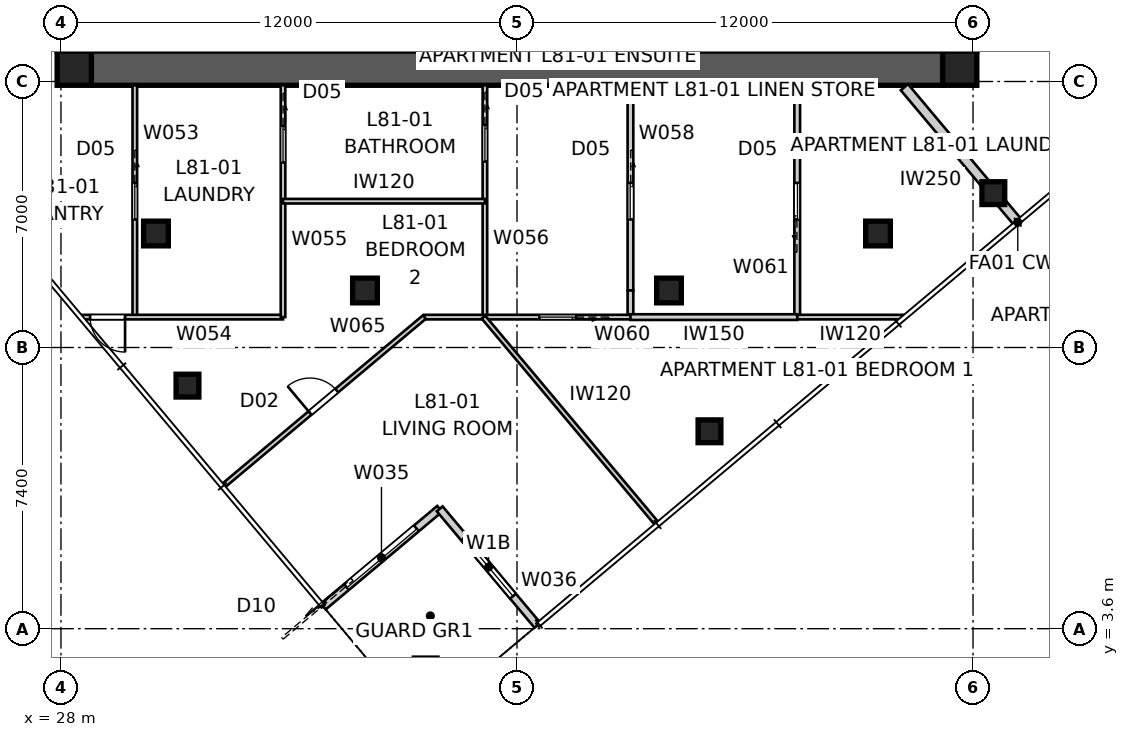
"""IFC4 building model, lengths in metres.
Left out: names, types, materials, properties, quantities, classifications, styles, units other than length and angle.
Written with IfcOpenShell. Run it as: python <this file> out.ifc"""

import sys

from ifc_helpers import new_model, si_unit, direction, frame, frame_2d, origin, origin_2d, place, context, subcontext, project, spatial, polyline, rectangle, outline, extrude, element, fill, save


model = new_model("IFC4")
c1 = context("Model", 3, precision=1e-05, world=origin(), true_north=direction((0.0, 1.0)))
c2 = subcontext(c1, "Body", "Model", "MODEL_VIEW")
j1 = project(units=[si_unit("LENGTHUNIT", "METRE"), si_unit("PLANEANGLEUNIT", "RADIAN")], contexts=[c1])
p1 = place(None, origin())
s1 = spatial("IfcSite", under=j1, at=p1, CompositionType="ELEMENT")
p2 = place(p1, origin())
s2 = spatial("IfcBuilding", under=s1, at=p2, CompositionType="ELEMENT")
p3 = place(p2, frame((0.0, 0.0, 293.0)))
s3 = spatial("IfcBuildingStorey", under=s2, at=p3, CompositionType="ELEMENT", Elevation=293.0)
p4 = place(p3, frame((51.2, 18.35, 0.0), z_axis=(0.0, 0.0, 1.0), x_axis=(-1.0, 0.0, 0.0)))
e1 = element("IfcWall", 1, at=p4, inside=s3, PredefinedType="SHEAR", context=c2, shape_type="SweptSolid", body=[
    extrude(outline(polyline([(0.0, -0.45), (22.4, -0.45), (22.4, -0.025), (22.85, -0.025), (22.85, 0.025), (22.4, 0.025), (22.4, 0.45), (0.0, 0.45), (0.0, 0.025), (-0.45, 0.025), (-0.45, -0.025), (0.0, -0.025), (0.0, -0.45)])), origin(), (0.0, 0.0, 1.0), 3.4),
])
p5 = place(p3, frame((51.65, 18.8, 0.0), z_axis=(0.0, 0.0, 1.0), x_axis=(0.0, 1.0, 0.0)))
e2 = element("IfcWall", 2, at=p5, inside=s3, PredefinedType="SHEAR", context=c2, shape_type="SweptSolid", body=[
    extrude(outline(polyline([(0.0, -0.45), (22.4, -0.45), (22.4, -0.025), (22.85, -0.025), (22.85, 0.025), (22.4, 0.025), (22.4, 0.45), (0.0, 0.45), (0.0, 0.025), (-0.45, 0.025), (-0.45, -0.025), (0.0, -0.025), (0.0, -0.45)])), origin(), (0.0, 0.0, 1.0), 3.4),
])
p6 = place(p5, frame((11.14, 0.0, 0.0)))
e3 = element("IfcOpeningElement", 3, at=p6, cuts=e2, PredefinedType="OPENING", context=c2, shape_type="SweptSolid", body=[
    extrude(rectangle(XDim=1.02, YDim=2.4, at=frame_2d((0.51, 1.2))), frame((0.0, 0.46, 0.0), z_axis=(0.0, -1.0, 0.0), x_axis=(1.0, 0.0, 0.0)), (0.0, 0.0, 1.0), 0.92),
])
p7 = place(p3, frame((28.35, 41.2, 0.0), z_axis=(0.0, 0.0, 1.0), x_axis=(0.0, -1.0, 0.0)))
e4 = element("IfcWall", 4, at=p7, inside=s3, PredefinedType="SHEAR", context=c2, shape_type="SweptSolid", body=[
    extrude(outline(polyline([(0.0, -0.45), (22.4, -0.45), (22.4, -0.025), (22.85, -0.025), (22.85, 0.025), (22.4, 0.025), (22.4, 0.45), (0.0, 0.45), (0.0, 0.025), (-0.45, 0.025), (-0.45, -0.025), (0.0, -0.025), (0.0, -0.45)])), origin(), (0.0, 0.0, 1.0), 3.4),
])
p8 = place(p7, frame((11.14, 0.0, 0.0)))
e5 = element("IfcOpeningElement", 5, at=p8, cuts=e4, PredefinedType="OPENING", context=c2, shape_type="SweptSolid", body=[
    extrude(rectangle(XDim=1.02, YDim=2.4, at=frame_2d((0.51, 1.2))), frame((0.0, 0.46, 0.0), z_axis=(0.0, -1.0, 0.0), x_axis=(1.0, 0.0, 0.0)), (0.0, 0.0, 1.0), 0.92),
])
for number, where, z_axis, x_axis in (
    (6, (28.35, 18.35, 0.0), (0.0, 0.0, 1.0), (1.0, 0.0, 0.0)),
    (7, (51.65, 18.35, 0.0), (0.0, 0.0, 1.0), (1.0, 0.0, 0.0)),
):
    element("IfcColumn", number, at=place(p3, frame(where, z_axis=z_axis, x_axis=x_axis)), inside=s3, PredefinedType="COLUMN", context=c2, shape_type="SweptSolid", body=[
        extrude(rectangle(XDim=0.9, YDim=0.9, at=origin_2d()), origin(), (0.0, 0.0, 1.0), 3.4),
    ])
for number, where, z_axis, x_axis in (
    (8, (45.065, 8.795, 0.0), (0.0, 0.0, 1.0), (1.0, 0.0, 0.0)),
    (9, (52.534, 15.062, 0.0), (0.0, 0.0, 1.0), (1.0, 0.0, 0.0)),
    (10, (31.329, 9.997, 0.0), (0.0, 0.0, 1.0), (1.0, 0.0, 0.0)),
):
    element("IfcColumn", number, at=place(p3, frame(where, z_axis=z_axis, x_axis=x_axis)), inside=s3, PredefinedType="COLUMN", context=c2, shape_type="SweptSolid", body=[
        extrude(rectangle(XDim=0.6, YDim=0.6, at=origin_2d()), origin(), (0.0, 0.0, 1.0), 3.4),
    ])
for number, where, z_axis, x_axis in (
    (11, (30.5, 14.0, 0.0), (0.0, 0.0, 1.0), (1.0, 0.0, 0.0)),
    (12, (36.0, 12.5, 0.0), (0.0, 0.0, 1.0), (1.0, 0.0, 0.0)),
    (13, (44.0, 12.5, 0.0), (0.0, 0.0, 1.0), (1.0, 0.0, 0.0)),
    (14, (49.5, 14.0, 0.0), (0.0, 0.0, 1.0), (1.0, 0.0, 0.0)),
):
    element("IfcColumn", number, at=place(p3, frame(where, z_axis=z_axis, x_axis=x_axis)), inside=s3, PredefinedType="COLUMN", context=c2, shape_type="SweptSolid", body=[
        extrude(rectangle(XDim=0.65, YDim=0.65, at=origin_2d()), origin(), (0.0, 0.0, 1.0), 3.4),
    ])
p9 = place(p3, frame((34.902, 4.183, 0.0), z_axis=(0.0, 0.0, 1.0), x_axis=(0.766060656284, 0.642768287094, 0.0)))
e15 = element("IfcWall", 15, at=p9, inside=s3, PredefinedType="SOLIDWALL", context=c2, shape_type="SweptSolid", body=[
    extrude(rectangle(XDim=4.0, YDim=0.2, at=frame_2d((2.0, 0.0))), origin(), (0.0, 0.0, 1.0), 3.25),
])
p10 = place(p9, frame((0.8, 0.0, 0.0)))
e16 = element("IfcOpeningElement", 16, at=p10, cuts=e15, PredefinedType="OPENING", context=c2, shape_type="SweptSolid", body=[
    extrude(rectangle(XDim=2.4, YDim=2.4, at=frame_2d((1.2, 1.2))), frame((0.0, 0.11, 0.0), z_axis=(0.0, -1.0, 0.0), x_axis=(1.0, 0.0, 0.0)), (0.0, 0.0, 1.0), 0.22),
])
p11 = place(p3, frame((37.966, 6.754, 0.0), z_axis=(0.0, 0.0, 1.0), x_axis=(0.642798342015, -0.766035437498, 0.0)))
e17 = element("IfcWall", 17, at=p11, inside=s3, PredefinedType="SOLIDWALL", context=c2, shape_type="SweptSolid", body=[
    extrude(rectangle(XDim=4.0, YDim=0.2, at=frame_2d((2.0, 0.0))), origin(), (0.0, 0.0, 1.0), 3.25),
])
p12 = place(p11, frame((1.0, 0.0, 0.45)))
e18 = element("IfcOpeningElement", 18, at=p12, cuts=e17, PredefinedType="OPENING", context=c2, shape_type="SweptSolid", body=[
    extrude(rectangle(XDim=2.0, YDim=1.8, at=frame_2d((1.0, 0.9))), frame((0.0, 0.11, 0.0), z_axis=(0.0, -1.0, 0.0), x_axis=(1.0, 0.0, 0.0)), (0.0, 0.0, 1.0), 0.22),
])
p13 = place(p3, frame((53.177, 14.296, 0.0), z_axis=(0.0, 0.0, 1.0), x_axis=(-0.64279957712, 0.76603440109, 0.0)))
e19 = element("IfcWall", 19, at=p13, inside=s3, PredefinedType="PARTITIONING", context=c2, shape_type="SweptSolid", body=[
    extrude(rectangle(XDim=4.64, YDim=0.25, at=frame_2d((2.32, 0.0))), origin(), (0.0, 0.0, 1.0), 3.25),
])
p14 = place(p3, frame((27.9, 19.172, 0.0), z_axis=(0.0, 0.0, 1.0), x_axis=(-0.766017381482, -0.642819859111, 0.0)))
e20 = element("IfcWall", 20, at=p14, inside=s3, PredefinedType="PARTITIONING", context=c2, shape_type="SweptSolid", body=[
    extrude(rectangle(XDim=4.231, YDim=0.12, at=frame_2d((2.115, 0.0))), origin(), (0.0, 0.0, 1.0), 3.25),
])
p15 = place(p14, frame((1.676, 0.0, 0.0)))
e21 = element("IfcOpeningElement", 21, at=p15, cuts=e20, PredefinedType="OPENING", context=c2, shape_type="SweptSolid", body=[
    extrude(rectangle(XDim=0.92, YDim=2.1, at=frame_2d((0.46, 1.05))), frame((0.0, 0.07, 0.0), z_axis=(0.0, -1.0, 0.0), x_axis=(1.0, 0.0, 0.0)), (0.0, 0.0, 1.0), 0.14),
])
p16 = place(p3, frame((29.944, 17.9, 0.0), z_axis=(0.0, 0.0, 1.0), x_axis=(0.0, -1.0, 0.0)))
e22 = element("IfcWall", 22, at=p16, inside=s3, PredefinedType="PARTITIONING", context=c2, shape_type="SweptSolid", body=[
    extrude(rectangle(XDim=6.1, YDim=0.12, at=frame_2d((3.05, 0.0))), origin(), (0.0, 0.0, 1.0), 3.25),
])
p17 = place(p16, frame((2.57, 0.0, 0.0)))
e23 = element("IfcOpeningElement", 23, at=p17, cuts=e22, PredefinedType="OPENING", context=c2, shape_type="SweptSolid", body=[
    extrude(rectangle(XDim=0.96, YDim=2.1, at=frame_2d((0.48, 1.05))), frame((0.0, 0.07, 0.0), z_axis=(0.0, -1.0, 0.0), x_axis=(1.0, 0.0, 0.0)), (0.0, 0.0, 1.0), 0.14),
])
p18 = place(p3, frame((33.844, 11.8, 0.0), z_axis=(0.0, 0.0, 1.0), x_axis=(-1.0, 0.0, 0.0)))
e24 = element("IfcWall", 24, at=p18, inside=s3, PredefinedType="PARTITIONING", context=c2, shape_type="SweptSolid", body=[
    extrude(rectangle(XDim=5.281, YDim=0.12, at=frame_2d((2.64, 0.0))), origin(), (0.0, 0.0, 1.0), 3.25),
])
p19 = place(p18, frame((4.156, 0.0, 0.0)))
e25 = element("IfcOpeningElement", 25, at=p19, cuts=e24, PredefinedType="OPENING", context=c2, shape_type="SweptSolid", body=[
    extrude(rectangle(XDim=0.92, YDim=2.34, at=frame_2d((0.46, 1.17))), frame((0.0, 0.07, 0.0), z_axis=(0.0, -1.0, 0.0), x_axis=(1.0, 0.0, 0.0)), (0.0, 0.0, 1.0), 0.14),
])
p20 = place(p3, frame((33.844, 17.9, 0.0), z_axis=(0.0, 0.0, 1.0), x_axis=(0.0, -1.0, 0.0)))
e26 = element("IfcWall", 26, at=p20, inside=s3, PredefinedType="PARTITIONING", context=c2, shape_type="SweptSolid", body=[
    extrude(rectangle(XDim=6.1, YDim=0.12, at=frame_2d((3.05, 0.0))), origin(), (0.0, 0.0, 1.0), 3.25),
])
p21 = place(p20, frame((1.07, 0.0, 0.0)))
e27 = element("IfcOpeningElement", 27, at=p21, cuts=e26, PredefinedType="OPENING", context=c2, shape_type="SweptSolid", body=[
    extrude(rectangle(XDim=0.96, YDim=2.1, at=frame_2d((0.48, 1.05))), frame((0.0, 0.07, 0.0), z_axis=(0.0, -1.0, 0.0), x_axis=(1.0, 0.0, 0.0)), (0.0, 0.0, 1.0), 0.14),
])
p22 = place(p3, frame((39.156, 17.9, 0.0), z_axis=(0.0, 0.0, 1.0), x_axis=(0.0, -1.0, 0.0)))
e28 = element("IfcWall", 28, at=p22, inside=s3, PredefinedType="PARTITIONING", context=c2, shape_type="SweptSolid", body=[
    extrude(rectangle(XDim=6.1, YDim=0.12, at=frame_2d((3.05, 0.0))), origin(), (0.0, 0.0, 1.0), 3.25),
])
p23 = place(p22, frame((1.045, 0.0, 0.0)))
e29 = element("IfcOpeningElement", 29, at=p23, cuts=e28, PredefinedType="OPENING", context=c2, shape_type="SweptSolid", body=[
    extrude(rectangle(XDim=0.96, YDim=2.1, at=frame_2d((0.48, 1.05))), frame((0.0, 0.07, 0.0), z_axis=(0.0, -1.0, 0.0), x_axis=(1.0, 0.0, 0.0)), (0.0, 0.0, 1.0), 0.14),
])
p24 = place(p3, frame((39.156, 14.85, 0.0), z_axis=(0.0, 0.0, 1.0), x_axis=(-1.0, 0.0, 0.0)))
e30 = element("IfcWall", 30, at=p24, inside=s3, PredefinedType="PARTITIONING", context=c2, shape_type="SweptSolid", body=[
    extrude(rectangle(XDim=5.312, YDim=0.12, at=frame_2d((2.656, 0.0))), origin(), (0.0, 0.0, 1.0), 3.25),
])
p25 = place(p3, frame((42.986, 17.9, 0.0), z_axis=(0.0, 0.0, 1.0), x_axis=(0.0, -1.0, 0.0)))
e31 = element("IfcWall", 31, at=p25, inside=s3, PredefinedType="SOLIDWALL", context=c2, shape_type="SweptSolid", body=[
    extrude(rectangle(XDim=5.4, YDim=0.15, at=frame_2d((2.7, 0.0))), origin(), (0.0, 0.0, 1.0), 2.796),
])
p26 = place(p25, frame((2.57, 0.0, 0.0)))
e32 = element("IfcOpeningElement", 32, at=p26, cuts=e31, PredefinedType="OPENING", context=c2, shape_type="SweptSolid", body=[
    extrude(rectangle(XDim=0.96, YDim=2.1, at=frame_2d((0.48, 1.05))), frame((0.0, 0.085, 0.0), z_axis=(0.0, -1.0, 0.0), x_axis=(1.0, 0.0, 0.0)), (0.0, 0.0, 1.0), 0.17),
])
p27 = place(p3, frame((42.986, 12.5, 0.0), z_axis=(0.0, 0.0, 1.0), x_axis=(0.0, -1.0, 0.0)))
e33 = element("IfcWall", 33, at=p27, inside=s3, PredefinedType="SOLIDWALL", context=c2, shape_type="SweptSolid", body=[
    extrude(rectangle(XDim=0.7, YDim=0.15, at=frame_2d((0.35, 0.0))), origin(), (0.0, 0.0, 1.0), 3.25),
])
p28 = place(p3, frame((42.986, 11.8, 0.0), z_axis=(0.0, 0.0, 1.0), x_axis=(-1.0, 0.0, 0.0)))
e34 = element("IfcWall", 34, at=p28, inside=s3, PredefinedType="PARTITIONING", context=c2, shape_type="SweptSolid", body=[
    extrude(rectangle(XDim=5.423, YDim=0.12, at=frame_2d((2.712, 0.0))), origin(), (0.0, 0.0, 1.0), 3.25),
])
p29 = place(p28, frame((1.435, 0.0, 0.0)))
e35 = element("IfcOpeningElement", 35, at=p29, cuts=e34, PredefinedType="OPENING", context=c2, shape_type="SweptSolid", body=[
    extrude(rectangle(XDim=0.96, YDim=2.1, at=frame_2d((0.48, 1.05))), frame((0.0, 0.07, 0.0), z_axis=(0.0, -1.0, 0.0), x_axis=(1.0, 0.0, 0.0)), (0.0, 0.0, 1.0), 0.14),
])
p30 = place(p3, frame((47.374, 11.8, 0.0), z_axis=(0.0, 0.0, 1.0), x_axis=(0.0, 1.0, 0.0)))
e36 = element("IfcWall", 36, at=p30, inside=s3, PredefinedType="SOLIDWALL", context=c2, shape_type="SweptSolid", body=[
    extrude(rectangle(XDim=6.1, YDim=0.15, at=frame_2d((3.05, 0.0))), origin(), (0.0, 0.0, 1.0), 3.25),
])
p31 = place(p30, frame((2.57, 0.0, 0.0)))
e37 = element("IfcOpeningElement", 37, at=p31, cuts=e36, PredefinedType="OPENING", context=c2, shape_type="SweptSolid", body=[
    extrude(rectangle(XDim=0.96, YDim=2.1, at=frame_2d((0.48, 1.05))), frame((0.0, 0.085, 0.0), z_axis=(0.0, -1.0, 0.0), x_axis=(1.0, 0.0, 0.0)), (0.0, 0.0, 1.0), 0.17),
])
p32 = place(p3, frame((50.162, 11.8, 0.0), z_axis=(0.0, 0.0, 1.0), x_axis=(-1.0, 0.0, 0.0)))
e38 = element("IfcWall", 38, at=p32, inside=s3, PredefinedType="PARTITIONING", context=c2, shape_type="SweptSolid", body=[
    extrude(rectangle(XDim=2.789, YDim=0.12, at=frame_2d((1.394, 0.0))), origin(), (0.0, 0.0, 1.0), 3.25),
])
p33 = place(p3, frame((47.374, 11.8, 0.0), z_axis=(0.0, 0.0, 1.0), x_axis=(-1.0, 0.0, 0.0)))
e39 = element("IfcWall", 39, at=p33, inside=s3, PredefinedType="SOLIDWALL", context=c2, shape_type="SweptSolid", body=[
    extrude(rectangle(XDim=4.388, YDim=0.15, at=frame_2d((2.194, 0.0))), origin(), (0.0, 0.0, 1.0), 3.25),
])
p34 = place(p3, frame((39.117, 11.8, 0.0), z_axis=(0.0, 0.0, 1.0), x_axis=(0.642790379821, -0.766042118691, 0.0)))
e40 = element("IfcWall", 40, at=p34, inside=s3, PredefinedType="PARTITIONING", context=c2, shape_type="SweptSolid", body=[
    extrude(rectangle(XDim=7.085, YDim=0.12, at=frame_2d((3.543, 0.0))), origin(), (0.0, 0.0, 1.0), 3.25),
])
p35 = place(p3, frame((32.281, 7.369, 0.0), z_axis=(0.0, 0.0, 1.0), x_axis=(0.766036842262, 0.642796667926, 0.0)))
e41 = element("IfcWall", 41, at=p35, inside=s3, PredefinedType="PARTITIONING", context=c2, shape_type="SweptSolid", body=[
    extrude(rectangle(XDim=6.894, YDim=0.12, at=frame_2d((3.447, 0.0))), origin(), (0.0, 0.0, 1.0), 3.25),
])
p36 = place(p35, frame((2.967, 0.0, 0.0)))
e42 = element("IfcOpeningElement", 42, at=p36, cuts=e41, PredefinedType="OPENING", context=c2, shape_type="SweptSolid", body=[
    extrude(rectangle(XDim=0.92, YDim=2.34, at=frame_2d((0.46, 1.17))), frame((0.0, 0.07, 0.0), z_axis=(0.0, -1.0, 0.0), x_axis=(1.0, 0.0, 0.0)), (0.0, 0.0, 1.0), 0.14),
])
p37 = place(p3, frame((52.1, 21.915, 0.0), z_axis=(0.0, 0.0, 1.0), x_axis=(0.642782544614, -0.766048693191, 0.0)))
e43 = element("IfcWall", 43, at=p37, inside=s3, PredefinedType="SOLIDWALL", context=c2, shape_type="SweptSolid", body=[
    extrude(rectangle(XDim=6.489, YDim=0.15, at=frame_2d((3.244, 0.0))), origin(), (0.0, 0.0, 1.0), 3.25),
])
p38 = place(p37, frame((2.784, 0.0, 0.0)))
e44 = element("IfcOpeningElement", 44, at=p38, cuts=e43, PredefinedType="OPENING", context=c2, shape_type="SweptSolid", body=[
    extrude(rectangle(XDim=0.96, YDim=2.1, at=frame_2d((0.48, 1.05))), frame((0.0, 0.085, 0.0), z_axis=(0.0, -1.0, 0.0), x_axis=(1.0, 0.0, 0.0)), (0.0, 0.0, 1.0), 0.17),
])
p39 = place(p10, origin())
e45 = element("IfcDoor", 45, at=p39, inside=s3, OperationType="SLIDING_TO_LEFT", PredefinedType="DOOR", context=c2, shape_type="SweptSolid", body=[
    extrude(rectangle(XDim=2.4, YDim=2.4, at=frame_2d((1.2, 1.2))), frame((0.0, 0.025, 0.0), z_axis=(0.0, -1.0, 0.0), x_axis=(1.0, 0.0, 0.0)), (0.0, 0.0, 1.0), 0.05),
])
fill(e16, e45)
p40 = place(p12, origin())
e46 = element("IfcWindow", 46, at=p40, inside=s3, PartitioningType="SINGLE_PANEL", PredefinedType="WINDOW", context=c2, shape_type="SweptSolid", body=[
    extrude(rectangle(XDim=2.0, YDim=1.8, at=frame_2d((1.0, 0.9))), frame((0.0, 0.03, 0.0), z_axis=(0.0, -1.0, 0.0), x_axis=(1.0, 0.0, 0.0)), (0.0, 0.0, 1.0), 0.06),
])
fill(e18, e46)
p41 = place(p17, origin())
e47 = element("IfcDoor", 47, at=p41, inside=s3, OperationType="SLIDING_TO_LEFT", PredefinedType="DOOR", context=c2, shape_type="SweptSolid", body=[
    extrude(rectangle(XDim=0.96, YDim=2.1, at=frame_2d((0.48, 1.05))), frame((0.0, 0.025, 0.0), z_axis=(0.0, -1.0, 0.0), x_axis=(1.0, 0.0, 0.0)), (0.0, 0.0, 1.0), 0.05),
])
fill(e23, e47)
p42 = place(p19, origin())
e48 = element("IfcDoor", 48, at=p42, inside=s3, OperationType="SINGLE_SWING_LEFT", PredefinedType="DOOR", context=c2, shape_type="SweptSolid", body=[
    extrude(rectangle(XDim=0.92, YDim=2.34, at=frame_2d((0.46, 1.17))), frame((0.0, 0.025, 0.0), z_axis=(0.0, -1.0, 0.0), x_axis=(1.0, 0.0, 0.0)), (0.0, 0.0, 1.0), 0.05),
])
fill(e25, e48)
p43 = place(p21, origin())
e49 = element("IfcDoor", 49, at=p43, inside=s3, OperationType="SLIDING_TO_LEFT", PredefinedType="DOOR", context=c2, shape_type="SweptSolid", body=[
    extrude(rectangle(XDim=0.96, YDim=2.1, at=frame_2d((0.48, 1.05))), frame((0.0, 0.025, 0.0), z_axis=(0.0, -1.0, 0.0), x_axis=(1.0, 0.0, 0.0)), (0.0, 0.0, 1.0), 0.05),
])
fill(e27, e49)
p44 = place(p23, origin())
e50 = element("IfcDoor", 50, at=p44, inside=s3, OperationType="SLIDING_TO_LEFT", PredefinedType="DOOR", context=c2, shape_type="SweptSolid", body=[
    extrude(rectangle(XDim=0.96, YDim=2.1, at=frame_2d((0.48, 1.05))), frame((0.0, 0.025, 0.0), z_axis=(0.0, -1.0, 0.0), x_axis=(1.0, 0.0, 0.0)), (0.0, 0.0, 1.0), 0.05),
])
fill(e29, e50)
p45 = place(p26, origin())
e51 = element("IfcDoor", 51, at=p45, inside=s3, OperationType="SLIDING_TO_LEFT", PredefinedType="DOOR", context=c2, shape_type="SweptSolid", body=[
    extrude(rectangle(XDim=0.96, YDim=2.1, at=frame_2d((0.48, 1.05))), frame((0.0, 0.025, 0.0), z_axis=(0.0, -1.0, 0.0), x_axis=(1.0, 0.0, 0.0)), (0.0, 0.0, 1.0), 0.05),
])
fill(e32, e51)
p46 = place(p29, origin())
e52 = element("IfcDoor", 52, at=p46, inside=s3, OperationType="SLIDING_TO_LEFT", PredefinedType="DOOR", context=c2, shape_type="SweptSolid", body=[
    extrude(rectangle(XDim=0.96, YDim=2.1, at=frame_2d((0.48, 1.05))), frame((0.0, 0.025, 0.0), z_axis=(0.0, -1.0, 0.0), x_axis=(1.0, 0.0, 0.0)), (0.0, 0.0, 1.0), 0.05),
])
fill(e35, e52)
p47 = place(p31, origin())
e53 = element("IfcDoor", 53, at=p47, inside=s3, OperationType="SLIDING_TO_LEFT", PredefinedType="DOOR", context=c2, shape_type="SweptSolid", body=[
    extrude(rectangle(XDim=0.96, YDim=2.1, at=frame_2d((0.48, 1.05))), frame((0.0, 0.025, 0.0), z_axis=(0.0, -1.0, 0.0), x_axis=(1.0, 0.0, 0.0)), (0.0, 0.0, 1.0), 0.05),
])
fill(e37, e53)
p48 = place(p36, origin())
e54 = element("IfcDoor", 54, at=p48, inside=s3, OperationType="SINGLE_SWING_LEFT", PredefinedType="DOOR", context=c2, shape_type="SweptSolid", body=[
    extrude(rectangle(XDim=0.92, YDim=2.34, at=frame_2d((0.46, 1.17))), frame((0.0, 0.025, 0.0), z_axis=(0.0, -1.0, 0.0), x_axis=(1.0, 0.0, 0.0)), (0.0, 0.0, 1.0), 0.05),
])
fill(e42, e54)
save(model, sys.argv[1])
